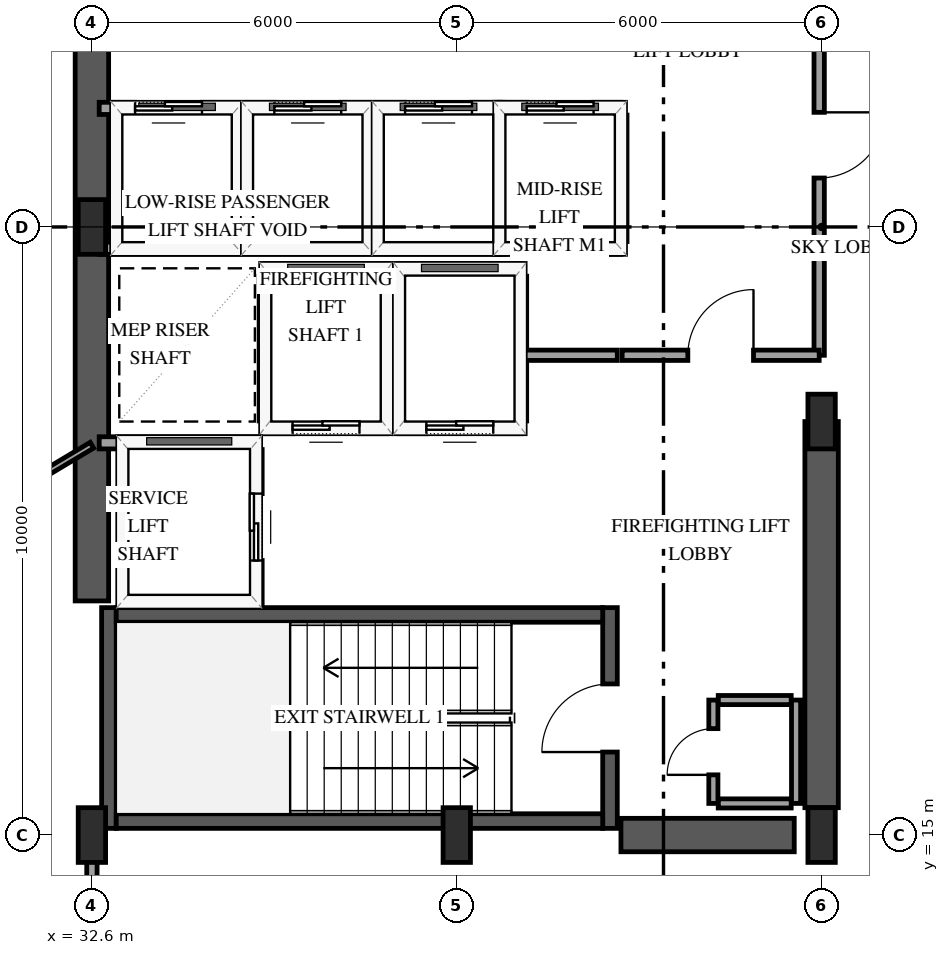
"""IFC4 building model, lengths in metres.
Left out: names, types, materials, properties, quantities, classifications, styles, units other than length and angle.
Written with IfcOpenShell. Run it as: python <this file> out.ifc"""

import sys

from ifc_helpers import new_model, si_unit, direction, frame, frame_2d, origin, origin_2d, place, context, subcontext, project, spatial, rectangle, extrude, element, fill, save


model = new_model("IFC4")
c1 = context("Model", 3, precision=1e-05, world=origin(), true_north=direction((0.0, 1.0)))
c2 = subcontext(c1, "Body", "Model", "MODEL_VIEW")
j1 = project(units=[si_unit("LENGTHUNIT", "METRE"), si_unit("PLANEANGLEUNIT", "RADIAN")], contexts=[c1])
p1 = place(None, origin())
s1 = spatial("IfcSite", under=j1, at=p1, CompositionType="ELEMENT")
p2 = place(p1, origin())
s2 = spatial("IfcBuilding", under=s1, at=p2, CompositionType="ELEMENT")
p3 = place(p2, frame((0.0, 0.0, 134.2)))
s3 = spatial("IfcBuildingStorey", under=s2, at=p3, CompositionType="ELEMENT", Elevation=134.2)
p4 = place(p3, frame((32.88, 15.11, 0.0), z_axis=(0.0, 0.0, 1.0), x_axis=(0.0, 1.0, 0.0)))
e1 = element("IfcWall", 1, at=p4, inside=s3, PredefinedType="SHEAR", context=c2, shape_type="SweptSolid", body=[
    extrude(rectangle(XDim=3.63, YDim=0.24, at=frame_2d((1.815, 0.0))), origin(), (0.0, 0.0, 1.0), 4.8),
])
p5 = place(p3, frame((41.12, 15.11, 0.0), z_axis=(0.0, 0.0, 1.0), x_axis=(0.0, 1.0, 0.0)))
e2 = element("IfcWall", 2, at=p5, inside=s3, PredefinedType="SHEAR", context=c2, shape_type="SweptSolid", body=[
    extrude(rectangle(XDim=3.63, YDim=0.24, at=frame_2d((1.815, 0.0))), origin(), (0.0, 0.0, 1.0), 4.8),
])
p6 = place(p5, frame((1.255, 0.0, 0.0)))
e3 = element("IfcOpeningElement", 3, at=p6, cuts=e2, PredefinedType="OPENING", context=c2, shape_type="SweptSolid", body=[
    extrude(rectangle(XDim=1.12, YDim=2.15, at=frame_2d((0.56, 1.075))), frame((0.0, 0.13, 0.0), z_axis=(0.0, -1.0, 0.0), x_axis=(1.0, 0.0, 0.0)), (0.0, 0.0, 1.0), 0.26),
])
for number, where, z_axis, x_axis in (
    (4, (33.0, 15.23, 0.0), (0.0, 0.0, 1.0), (1.0, 0.0, 0.0)),
    (5, (33.0, 18.62, 0.0), (0.0, 0.0, 1.0), (1.0, 0.0, 0.0)),
):
    element("IfcWall", number, at=place(p3, frame(where, z_axis=z_axis, x_axis=x_axis)), inside=s3, PredefinedType="SHEAR", context=c2, shape_type="SweptSolid", body=[
        extrude(rectangle(XDim=8.0, YDim=0.24, at=frame_2d((4.0, 0.0))), origin(), (0.0, 0.0, 1.0), 4.8),
    ])
p7 = place(p3, frame((32.6, 18.85, 0.0), z_axis=(0.0, 0.0, 1.0), x_axis=(0.0, 1.0, 0.0)))
e6 = element("IfcWall", 6, at=p7, inside=s3, PredefinedType="SHEAR", context=c2, shape_type="SweptSolid", body=[
    extrude(rectangle(XDim=12.3, YDim=0.55, at=frame_2d((6.15, 0.0))), origin(), (0.0, 0.0, 1.0), 4.8),
])
p8 = place(p3, frame((41.3, 15.0, 0.0), z_axis=(0.0, 0.0, 1.0), x_axis=(1.0, 0.0, 0.0)))
e7 = element("IfcWall", 7, at=p8, inside=s3, PredefinedType="SHEAR", context=c2, shape_type="SweptSolid", body=[
    extrude(rectangle(XDim=2.85, YDim=0.55, at=frame_2d((1.425, 0.0))), origin(), (0.0, 0.0, 1.0), 4.8),
])
p9 = place(p3, frame((44.6, 15.45, 0.0), z_axis=(0.0, 0.0, 1.0), x_axis=(0.0, 1.0, 0.0)))
e8 = element("IfcWall", 8, at=p9, inside=s3, PredefinedType="SHEAR", context=c2, shape_type="SweptSolid", body=[
    extrude(rectangle(XDim=6.35, YDim=0.55, at=frame_2d((3.175, 0.0))), origin(), (0.0, 0.0, 1.0), 4.8),
])
for number, where, z_axis, x_axis in (
    (9, (32.6, 15.0, 0.0), (0.0, 0.0, 1.0), (1.0, 0.0, 0.0)),
    (10, (32.6, 25.0, 0.0), (0.0, 0.0, 1.0), (1.0, 0.0, 0.0)),
    (11, (38.6, 15.0, 0.0), (0.0, 0.0, 1.0), (1.0, 0.0, 0.0)),
    (12, (44.6, 15.0, 0.0), (0.0, 0.0, 1.0), (1.0, 0.0, 0.0)),
    (13, (44.6, 21.8, 0.0), (0.0, 0.0, 1.0), (1.0, 0.0, 0.0)),
):
    element("IfcColumn", number, at=place(p3, frame(where, z_axis=z_axis, x_axis=x_axis)), inside=s3, PredefinedType="PILASTER", context=c2, shape_type="SweptSolid", body=[
        extrude(rectangle(XDim=0.45, YDim=0.9, at=origin_2d()), origin(), (0.0, 0.0, 1.0), 4.5),
    ])
p10 = place(p3, frame((35.45, 21.7, 0.0), z_axis=(0.0, 0.0, 1.0), x_axis=(1.0, 0.0, 0.0)))
e14 = element("IfcWall", 14, at=p10, inside=s3, PredefinedType="SOLIDWALL", context=c2, shape_type="SweptSolid", body=[
    extrude(rectangle(XDim=2.0, YDim=0.2, at=frame_2d((1.0, 0.0))), origin(), (0.0, 0.0, 1.0), 4.5),
])
p11 = place(p10, frame((0.45, 0.0, 0.0)))
e15 = element("IfcOpeningElement", 15, at=p11, cuts=e14, PredefinedType="OPENING", context=c2, shape_type="SweptSolid", body=[
    extrude(rectangle(XDim=1.1, YDim=2.15, at=frame_2d((0.55, 1.075))), frame((0.0, 0.11, 0.0), z_axis=(0.0, -1.0, 0.0), x_axis=(1.0, 0.0, 0.0)), (0.0, 0.0, 1.0), 0.22),
])
p12 = place(p3, frame((35.45, 24.3, 0.0), z_axis=(0.0, 0.0, 1.0), x_axis=(1.0, 0.0, 0.0)))
e16 = element("IfcWall", 16, at=p12, inside=s3, PredefinedType="SOLIDWALL", context=c2, shape_type="SweptSolid", body=[
    extrude(rectangle(XDim=2.0, YDim=0.2, at=frame_2d((1.0, 0.0))), origin(), (0.0, 0.0, 1.0), 4.5),
])
for number, where, z_axis, x_axis in (
    (17, (35.45, 21.81, 0.0), (0.0, 0.0, 1.0), (0.0, 1.0, 0.0)),
    (18, (37.45, 21.81, 0.0), (0.0, 0.0, 1.0), (0.0, 1.0, 0.0)),
):
    element("IfcWall", number, at=place(p3, frame(where, z_axis=z_axis, x_axis=x_axis)), inside=s3, PredefinedType="SOLIDWALL", context=c2, shape_type="SweptSolid", body=[
        extrude(rectangle(XDim=2.38, YDim=0.2, at=frame_2d((1.19, 0.0))), origin(), (0.0, 0.0, 1.0), 4.5),
    ])
p13 = place(p3, frame((37.65, 21.7, 0.0), z_axis=(0.0, 0.0, 1.0), x_axis=(1.0, 0.0, 0.0)))
e19 = element("IfcWall", 19, at=p13, inside=s3, PredefinedType="SOLIDWALL", context=c2, shape_type="SweptSolid", body=[
    extrude(rectangle(XDim=2.0, YDim=0.2, at=frame_2d((1.0, 0.0))), origin(), (0.0, 0.0, 1.0), 4.5),
])
p14 = place(p13, frame((0.45, 0.0, 0.0)))
e20 = element("IfcOpeningElement", 20, at=p14, cuts=e19, PredefinedType="OPENING", context=c2, shape_type="SweptSolid", body=[
    extrude(rectangle(XDim=1.1, YDim=2.15, at=frame_2d((0.55, 1.075))), frame((0.0, 0.11, 0.0), z_axis=(0.0, -1.0, 0.0), x_axis=(1.0, 0.0, 0.0)), (0.0, 0.0, 1.0), 0.22),
])
p15 = place(p3, frame((37.65, 24.3, 0.0), z_axis=(0.0, 0.0, 1.0), x_axis=(1.0, 0.0, 0.0)))
e21 = element("IfcWall", 21, at=p15, inside=s3, PredefinedType="SOLIDWALL", context=c2, shape_type="SweptSolid", body=[
    extrude(rectangle(XDim=2.0, YDim=0.2, at=frame_2d((1.0, 0.0))), origin(), (0.0, 0.0, 1.0), 4.5),
])
p16 = place(p3, frame((39.65, 21.81, 0.0), z_axis=(0.0, 0.0, 1.0), x_axis=(0.0, 1.0, 0.0)))
e22 = element("IfcWall", 22, at=p16, inside=s3, PredefinedType="SOLIDWALL", context=c2, shape_type="SweptSolid", body=[
    extrude(rectangle(XDim=2.38, YDim=0.2, at=frame_2d((1.19, 0.0))), origin(), (0.0, 0.0, 1.0), 4.5),
])
p17 = place(p3, frame((32.72, 21.45, 0.0), z_axis=(0.0, 0.0, 1.0), x_axis=(1.0, 0.0, 0.0)))
e23 = element("IfcWall", 23, at=p17, inside=s3, PredefinedType="SOLIDWALL", context=c2, shape_type="SweptSolid", body=[
    extrude(rectangle(XDim=2.58, YDim=0.2, at=frame_2d((1.29, 0.0))), origin(), (0.0, 0.0, 1.0), 4.5),
])
p18 = place(p3, frame((35.3, 18.79, 0.0), z_axis=(0.0, 0.0, 1.0), x_axis=(0.0, 1.0, 0.0)))
e24 = element("IfcWall", 24, at=p18, inside=s3, PredefinedType="SOLIDWALL", context=c2, shape_type="SweptSolid", body=[
    extrude(rectangle(XDim=2.55, YDim=0.2, at=frame_2d((1.275, 0.0))), origin(), (0.0, 0.0, 1.0), 4.5),
])
p19 = place(p18, frame((0.725, 0.0, 0.0)))
e25 = element("IfcOpeningElement", 25, at=p19, cuts=e24, PredefinedType="OPENING", context=c2, shape_type="SweptSolid", body=[
    extrude(rectangle(XDim=1.1, YDim=2.15, at=frame_2d((0.55, 1.075))), frame((0.0, 0.11, 0.0), z_axis=(0.0, -1.0, 0.0), x_axis=(1.0, 0.0, 0.0)), (0.0, 0.0, 1.0), 0.22),
])
p20 = place(p3, frame((32.72, 24.65, 0.0), z_axis=(0.0, 0.0, 1.0), x_axis=(1.0, 0.0, 0.0)))
e26 = element("IfcWall", 26, at=p20, inside=s3, PredefinedType="SOLIDWALL", context=c2, shape_type="SweptSolid", body=[
    extrude(rectangle(XDim=2.28, YDim=0.2, at=frame_2d((1.14, 0.0))), origin(), (0.0, 0.0, 1.0), 4.5),
])
p21 = place(p3, frame((32.72, 26.95, 0.0), z_axis=(0.0, 0.0, 1.0), x_axis=(1.0, 0.0, 0.0)))
e27 = element("IfcWall", 27, at=p21, inside=s3, PredefinedType="SOLIDWALL", context=c2, shape_type="SweptSolid", body=[
    extrude(rectangle(XDim=2.28, YDim=0.2, at=frame_2d((1.14, 0.0))), origin(), (0.0, 0.0, 1.0), 4.5),
])
p22 = place(p21, frame((0.59, 0.0, 0.0)))
e28 = element("IfcOpeningElement", 28, at=p22, cuts=e27, PredefinedType="OPENING", context=c2, shape_type="SweptSolid", body=[
    extrude(rectangle(XDim=1.1, YDim=2.15, at=frame_2d((0.55, 1.075))), frame((0.0, 0.11, 0.0), z_axis=(0.0, -1.0, 0.0), x_axis=(1.0, 0.0, 0.0)), (0.0, 0.0, 1.0), 0.22),
])
p23 = place(p3, frame((35.0, 24.76, 0.0), z_axis=(0.0, 0.0, 1.0), x_axis=(0.0, 1.0, 0.0)))
e29 = element("IfcWall", 29, at=p23, inside=s3, PredefinedType="SOLIDWALL", context=c2, shape_type="SweptSolid", body=[
    extrude(rectangle(XDim=2.08, YDim=0.2, at=frame_2d((1.04, 0.0))), origin(), (0.0, 0.0, 1.0), 4.5),
])
p24 = place(p3, frame((35.15, 24.65, 0.0), z_axis=(0.0, 0.0, 1.0), x_axis=(1.0, 0.0, 0.0)))
e30 = element("IfcWall", 30, at=p24, inside=s3, PredefinedType="SOLIDWALL", context=c2, shape_type="SweptSolid", body=[
    extrude(rectangle(XDim=2.0, YDim=0.2, at=frame_2d((1.0, 0.0))), origin(), (0.0, 0.0, 1.0), 4.5),
])
p25 = place(p3, frame((35.15, 26.95, 0.0), z_axis=(0.0, 0.0, 1.0), x_axis=(1.0, 0.0, 0.0)))
e31 = element("IfcWall", 31, at=p25, inside=s3, PredefinedType="SOLIDWALL", context=c2, shape_type="SweptSolid", body=[
    extrude(rectangle(XDim=2.0, YDim=0.2, at=frame_2d((1.0, 0.0))), origin(), (0.0, 0.0, 1.0), 4.5),
])
p26 = place(p25, frame((0.45, 0.0, 0.0)))
e32 = element("IfcOpeningElement", 32, at=p26, cuts=e31, PredefinedType="OPENING", context=c2, shape_type="SweptSolid", body=[
    extrude(rectangle(XDim=1.1, YDim=2.15, at=frame_2d((0.55, 1.075))), frame((0.0, 0.11, 0.0), z_axis=(0.0, -1.0, 0.0), x_axis=(1.0, 0.0, 0.0)), (0.0, 0.0, 1.0), 0.22),
])
p27 = place(p3, frame((37.15, 24.76, 0.0), z_axis=(0.0, 0.0, 1.0), x_axis=(0.0, 1.0, 0.0)))
e33 = element("IfcWall", 33, at=p27, inside=s3, PredefinedType="SOLIDWALL", context=c2, shape_type="SweptSolid", body=[
    extrude(rectangle(XDim=2.08, YDim=0.2, at=frame_2d((1.04, 0.0))), origin(), (0.0, 0.0, 1.0), 4.5),
])
p28 = place(p3, frame((37.3, 24.65, 0.0), z_axis=(0.0, 0.0, 1.0), x_axis=(1.0, 0.0, 0.0)))
e34 = element("IfcWall", 34, at=p28, inside=s3, PredefinedType="SOLIDWALL", context=c2, shape_type="SweptSolid", body=[
    extrude(rectangle(XDim=2.0, YDim=0.2, at=frame_2d((1.0, 0.0))), origin(), (0.0, 0.0, 1.0), 4.5),
])
p29 = place(p3, frame((37.3, 26.95, 0.0), z_axis=(0.0, 0.0, 1.0), x_axis=(1.0, 0.0, 0.0)))
e35 = element("IfcWall", 35, at=p29, inside=s3, PredefinedType="SOLIDWALL", context=c2, shape_type="SweptSolid", body=[
    extrude(rectangle(XDim=2.0, YDim=0.2, at=frame_2d((1.0, 0.0))), origin(), (0.0, 0.0, 1.0), 4.5),
])
p30 = place(p29, frame((0.45, 0.0, 0.0)))
e36 = element("IfcOpeningElement", 36, at=p30, cuts=e35, PredefinedType="OPENING", context=c2, shape_type="SweptSolid", body=[
    extrude(rectangle(XDim=1.1, YDim=2.15, at=frame_2d((0.55, 1.075))), frame((0.0, 0.11, 0.0), z_axis=(0.0, -1.0, 0.0), x_axis=(1.0, 0.0, 0.0)), (0.0, 0.0, 1.0), 0.22),
])
p31 = place(p3, frame((39.3, 24.76, 0.0), z_axis=(0.0, 0.0, 1.0), x_axis=(0.0, 1.0, 0.0)))
e37 = element("IfcWall", 37, at=p31, inside=s3, PredefinedType="SOLIDWALL", context=c2, shape_type="SweptSolid", body=[
    extrude(rectangle(XDim=2.08, YDim=0.2, at=frame_2d((1.04, 0.0))), origin(), (0.0, 0.0, 1.0), 4.5),
])
p32 = place(p3, frame((39.3, 24.65, 0.0), z_axis=(0.0, 0.0, 1.0), x_axis=(1.0, 0.0, 0.0)))
e38 = element("IfcWall", 38, at=p32, inside=s3, PredefinedType="SOLIDWALL", context=c2, shape_type="SweptSolid", body=[
    extrude(rectangle(XDim=2.0, YDim=0.2, at=frame_2d((1.0, 0.0))), origin(), (0.0, 0.0, 1.0), 4.5),
])
p33 = place(p3, frame((39.3, 26.95, 0.0), z_axis=(0.0, 0.0, 1.0), x_axis=(1.0, 0.0, 0.0)))
e39 = element("IfcWall", 39, at=p33, inside=s3, PredefinedType="SOLIDWALL", context=c2, shape_type="SweptSolid", body=[
    extrude(rectangle(XDim=2.0, YDim=0.2, at=frame_2d((1.0, 0.0))), origin(), (0.0, 0.0, 1.0), 4.5),
])
p34 = place(p33, frame((0.45, 0.0, 0.0)))
e40 = element("IfcOpeningElement", 40, at=p34, cuts=e39, PredefinedType="OPENING", context=c2, shape_type="SweptSolid", body=[
    extrude(rectangle(XDim=1.1, YDim=2.15, at=frame_2d((0.55, 1.075))), frame((0.0, 0.11, 0.0), z_axis=(0.0, -1.0, 0.0), x_axis=(1.0, 0.0, 0.0)), (0.0, 0.0, 1.0), 0.22),
])
p35 = place(p3, frame((41.3, 24.76, 0.0), z_axis=(0.0, 0.0, 1.0), x_axis=(0.0, 1.0, 0.0)))
e41 = element("IfcWall", 41, at=p35, inside=s3, PredefinedType="SOLIDWALL", context=c2, shape_type="SweptSolid", body=[
    extrude(rectangle(XDim=2.08, YDim=0.2, at=frame_2d((1.04, 0.0))), origin(), (0.0, 0.0, 1.0), 4.5),
])
for number, where, z_axis, x_axis in (
    (42, (42.9, 15.52, 0.0), (0.0, 0.0, 1.0), (1.0, 0.0, 0.0)),
    (43, (42.9, 17.22, 0.0), (0.0, 0.0, 1.0), (1.0, 0.0, 0.0)),
):
    element("IfcWall", number, at=place(p3, frame(where, z_axis=z_axis, x_axis=x_axis)), inside=s3, PredefinedType="PARTITIONING", context=c2, shape_type="SweptSolid", body=[
        extrude(rectangle(XDim=1.2, YDim=0.15, at=frame_2d((0.6, 0.0))), origin(), (0.0, 0.0, 1.0), 4.5),
    ])
p36 = place(p3, frame((44.18, 15.52, 0.0), z_axis=(0.0, 0.0, 1.0), x_axis=(0.0, 1.0, 0.0)))
e44 = element("IfcWall", 44, at=p36, inside=s3, PredefinedType="PARTITIONING", context=c2, shape_type="SweptSolid", body=[
    extrude(rectangle(XDim=1.7, YDim=0.15, at=frame_2d((0.85, 0.0))), origin(), (0.0, 0.0, 1.0), 4.5),
])
p37 = place(p3, frame((42.82, 15.52, 0.0), z_axis=(0.0, 0.0, 1.0), x_axis=(0.0, 1.0, 0.0)))
e45 = element("IfcWall", 45, at=p37, inside=s3, PredefinedType="PARTITIONING", context=c2, shape_type="SweptSolid", body=[
    extrude(rectangle(XDim=1.7, YDim=0.15, at=frame_2d((0.85, 0.0))), origin(), (0.0, 0.0, 1.0), 4.5),
])
p38 = place(p37, frame((0.47, 0.0, 0.0)))
e46 = element("IfcOpeningElement", 46, at=p38, cuts=e45, PredefinedType="OPENING", context=c2, shape_type="SweptSolid", body=[
    extrude(rectangle(XDim=0.76, YDim=2.0, at=frame_2d((0.38, 1.0))), frame((0.0, 0.085, 0.0), z_axis=(0.0, -1.0, 0.0), x_axis=(1.0, 0.0, 0.0)), (0.0, 0.0, 1.0), 0.17),
])
p39 = place(p3, frame((44.56, 29.8, 0.0), z_axis=(0.0, 0.0, 1.0), x_axis=(0.0, -1.0, 0.0)))
e47 = element("IfcWall", 47, at=p39, inside=s3, PredefinedType="PARTITIONING", context=c2, shape_type="SweptSolid", body=[
    extrude(rectangle(XDim=6.91, YDim=0.17, at=frame_2d((3.455, 0.0))), origin(), (0.0, 0.0, 1.0), 3.54),
])
p40 = place(p39, frame((2.915, 0.0, 0.0)))
e48 = element("IfcOpeningElement", 48, at=p40, cuts=e47, PredefinedType="OPENING", context=c2, shape_type="SweptSolid", body=[
    extrude(rectangle(XDim=1.08, YDim=2.15, at=frame_2d((0.54, 1.075))), frame((0.0, 0.095, 0.0), z_axis=(0.0, -1.0, 0.0), x_axis=(1.0, 0.0, 0.0)), (0.0, 0.0, 1.0), 0.19),
])
p41 = place(p3, frame((32.6, 21.411, 0.0), z_axis=(0.0, 0.0, 1.0), x_axis=(-0.858300031482, -0.513148181287, 0.0)))
e49 = element("IfcWall", 49, at=p41, inside=s3, PredefinedType="PARTITIONING", context=c2, shape_type="SweptSolid", body=[
    extrude(rectangle(XDim=5.224, YDim=0.11, at=frame_2d((2.612, 0.0))), origin(), (0.0, 0.0, 1.0), 4.5),
])
p42 = place(p3, frame((41.32, 22.89, 0.0), z_axis=(0.0, 0.0, 1.0), x_axis=(1.0, 0.0, 0.0)))
e50 = element("IfcWall", 50, at=p42, inside=s3, PredefinedType="PARTITIONING", context=c2, shape_type="SweptSolid", body=[
    extrude(rectangle(XDim=3.24, YDim=0.17, at=frame_2d((1.62, 0.0))), origin(), (0.0, 0.0, 1.0), 4.5),
])
p43 = place(p42, frame((1.08, 0.0, 0.0)))
e51 = element("IfcOpeningElement", 51, at=p43, cuts=e50, PredefinedType="OPENING", context=c2, shape_type="SweptSolid", body=[
    extrude(rectangle(XDim=1.08, YDim=2.15, at=frame_2d((0.54, 1.075))), frame((0.0, 0.095, 0.0), z_axis=(0.0, -1.0, 0.0), x_axis=(1.0, 0.0, 0.0)), (0.0, 0.0, 1.0), 0.19),
])
p44 = place(p3, frame((32.6, 12.384, 0.0), z_axis=(0.0, 0.0, 1.0), x_axis=(0.0, 1.0, 0.0)))
e52 = element("IfcWall", 52, at=p44, inside=s3, PredefinedType="PARTITIONING", context=c2, shape_type="SweptSolid", body=[
    extrude(rectangle(XDim=2.546, YDim=0.17, at=frame_2d((1.273, 0.0))), origin(), (0.0, 0.0, 1.0), 4.5),
])
p45 = place(p3, frame((39.72, 22.89, 0.0), z_axis=(0.0, 0.0, 1.0), x_axis=(1.0, 0.0, 0.0)))
e53 = element("IfcWall", 53, at=p45, inside=s3, PredefinedType="PARTITIONING", context=c2, shape_type="SweptSolid", body=[
    extrude(rectangle(XDim=1.52, YDim=0.17, at=frame_2d((0.76, 0.0))), origin(), (0.0, 0.0, 1.0), 4.5),
])
p46 = place(p11, origin())
e54 = element("IfcDoor", 54, at=p46, inside=s3, OperationType="SLIDING_TO_LEFT", PredefinedType="DOOR", context=c2, shape_type="SweptSolid", body=[
    extrude(rectangle(XDim=1.1, YDim=2.15, at=frame_2d((0.55, 1.075))), frame((0.0, 0.025, 0.0), z_axis=(0.0, -1.0, 0.0), x_axis=(1.0, 0.0, 0.0)), (0.0, 0.0, 1.0), 0.05),
])
fill(e15, e54)
p47 = place(p14, origin())
e55 = element("IfcDoor", 55, at=p47, inside=s3, OperationType="SLIDING_TO_LEFT", PredefinedType="DOOR", context=c2, shape_type="SweptSolid", body=[
    extrude(rectangle(XDim=1.1, YDim=2.15, at=frame_2d((0.55, 1.075))), frame((0.0, 0.025, 0.0), z_axis=(0.0, -1.0, 0.0), x_axis=(1.0, 0.0, 0.0)), (0.0, 0.0, 1.0), 0.05),
])
fill(e20, e55)
p48 = place(p19, origin())
e56 = element("IfcDoor", 56, at=p48, inside=s3, OperationType="SLIDING_TO_LEFT", PredefinedType="DOOR", context=c2, shape_type="SweptSolid", body=[
    extrude(rectangle(XDim=1.1, YDim=2.15, at=frame_2d((0.55, 1.075))), frame((0.0, 0.025, 0.0), z_axis=(0.0, -1.0, 0.0), x_axis=(1.0, 0.0, 0.0)), (0.0, 0.0, 1.0), 0.05),
])
fill(e25, e56)
p49 = place(p22, origin())
e57 = element("IfcDoor", 57, at=p49, inside=s3, OperationType="SLIDING_TO_LEFT", PredefinedType="DOOR", context=c2, shape_type="SweptSolid", body=[
    extrude(rectangle(XDim=1.1, YDim=2.15, at=frame_2d((0.55, 1.075))), frame((0.0, 0.025, 0.0), z_axis=(0.0, -1.0, 0.0), x_axis=(1.0, 0.0, 0.0)), (0.0, 0.0, 1.0), 0.05),
])
fill(e28, e57)
p50 = place(p26, origin())
e58 = element("IfcDoor", 58, at=p50, inside=s3, OperationType="SLIDING_TO_LEFT", PredefinedType="DOOR", context=c2, shape_type="SweptSolid", body=[
    extrude(rectangle(XDim=1.1, YDim=2.15, at=frame_2d((0.55, 1.075))), frame((0.0, 0.025, 0.0), z_axis=(0.0, -1.0, 0.0), x_axis=(1.0, 0.0, 0.0)), (0.0, 0.0, 1.0), 0.05),
])
fill(e32, e58)
p51 = place(p30, origin())
e59 = element("IfcDoor", 59, at=p51, inside=s3, OperationType="SLIDING_TO_LEFT", PredefinedType="DOOR", context=c2, shape_type="SweptSolid", body=[
    extrude(rectangle(XDim=1.1, YDim=2.15, at=frame_2d((0.55, 1.075))), frame((0.0, 0.025, 0.0), z_axis=(0.0, -1.0, 0.0), x_axis=(1.0, 0.0, 0.0)), (0.0, 0.0, 1.0), 0.05),
])
fill(e36, e59)
p52 = place(p34, origin())
e60 = element("IfcDoor", 60, at=p52, inside=s3, OperationType="SLIDING_TO_LEFT", PredefinedType="DOOR", context=c2, shape_type="SweptSolid", body=[
    extrude(rectangle(XDim=1.1, YDim=2.15, at=frame_2d((0.55, 1.075))), frame((0.0, 0.025, 0.0), z_axis=(0.0, -1.0, 0.0), x_axis=(1.0, 0.0, 0.0)), (0.0, 0.0, 1.0), 0.05),
])
fill(e40, e60)
p53 = place(p6, origin())
e61 = element("IfcDoor", 61, at=p53, inside=s3, OperationType="SINGLE_SWING_LEFT", PredefinedType="DOOR", context=c2, shape_type="SweptSolid", body=[
    extrude(rectangle(XDim=1.12, YDim=2.15, at=frame_2d((0.56, 1.075))), frame((0.0, 0.025, 0.0), z_axis=(0.0, -1.0, 0.0), x_axis=(1.0, 0.0, 0.0)), (0.0, 0.0, 1.0), 0.05),
])
fill(e3, e61)
p54 = place(p38, origin())
e62 = element("IfcDoor", 62, at=p54, inside=s3, OperationType="SINGLE_SWING_LEFT", PredefinedType="TRAPDOOR", context=c2, shape_type="SweptSolid", body=[
    extrude(rectangle(XDim=0.76, YDim=2.0, at=frame_2d((0.38, 1.0))), frame((0.0, 0.025, 0.0), z_axis=(0.0, -1.0, 0.0), x_axis=(1.0, 0.0, 0.0)), (0.0, 0.0, 1.0), 0.05),
])
fill(e46, e62)
p55 = place(p40, origin())
e63 = element("IfcDoor", 63, at=p55, inside=s3, OperationType="SINGLE_SWING_LEFT", PredefinedType="DOOR", context=c2, shape_type="SweptSolid", body=[
    extrude(rectangle(XDim=1.08, YDim=2.15, at=frame_2d((0.54, 1.075))), frame((0.0, 0.025, 0.0), z_axis=(0.0, -1.0, 0.0), x_axis=(1.0, 0.0, 0.0)), (0.0, 0.0, 1.0), 0.05),
])
fill(e48, e63)
p56 = place(p43, origin())
e64 = element("IfcDoor", 64, at=p56, inside=s3, OperationType="SINGLE_SWING_RIGHT", PredefinedType="DOOR", context=c2, shape_type="SweptSolid", body=[
    extrude(rectangle(XDim=1.08, YDim=2.15, at=frame_2d((0.54, 1.075))), frame((0.0, 0.025, 0.0), z_axis=(0.0, -1.0, 0.0), x_axis=(1.0, 0.0, 0.0)), (0.0, 0.0, 1.0), 0.05),
])
fill(e51, e64)
save(model, sys.argv[1])
